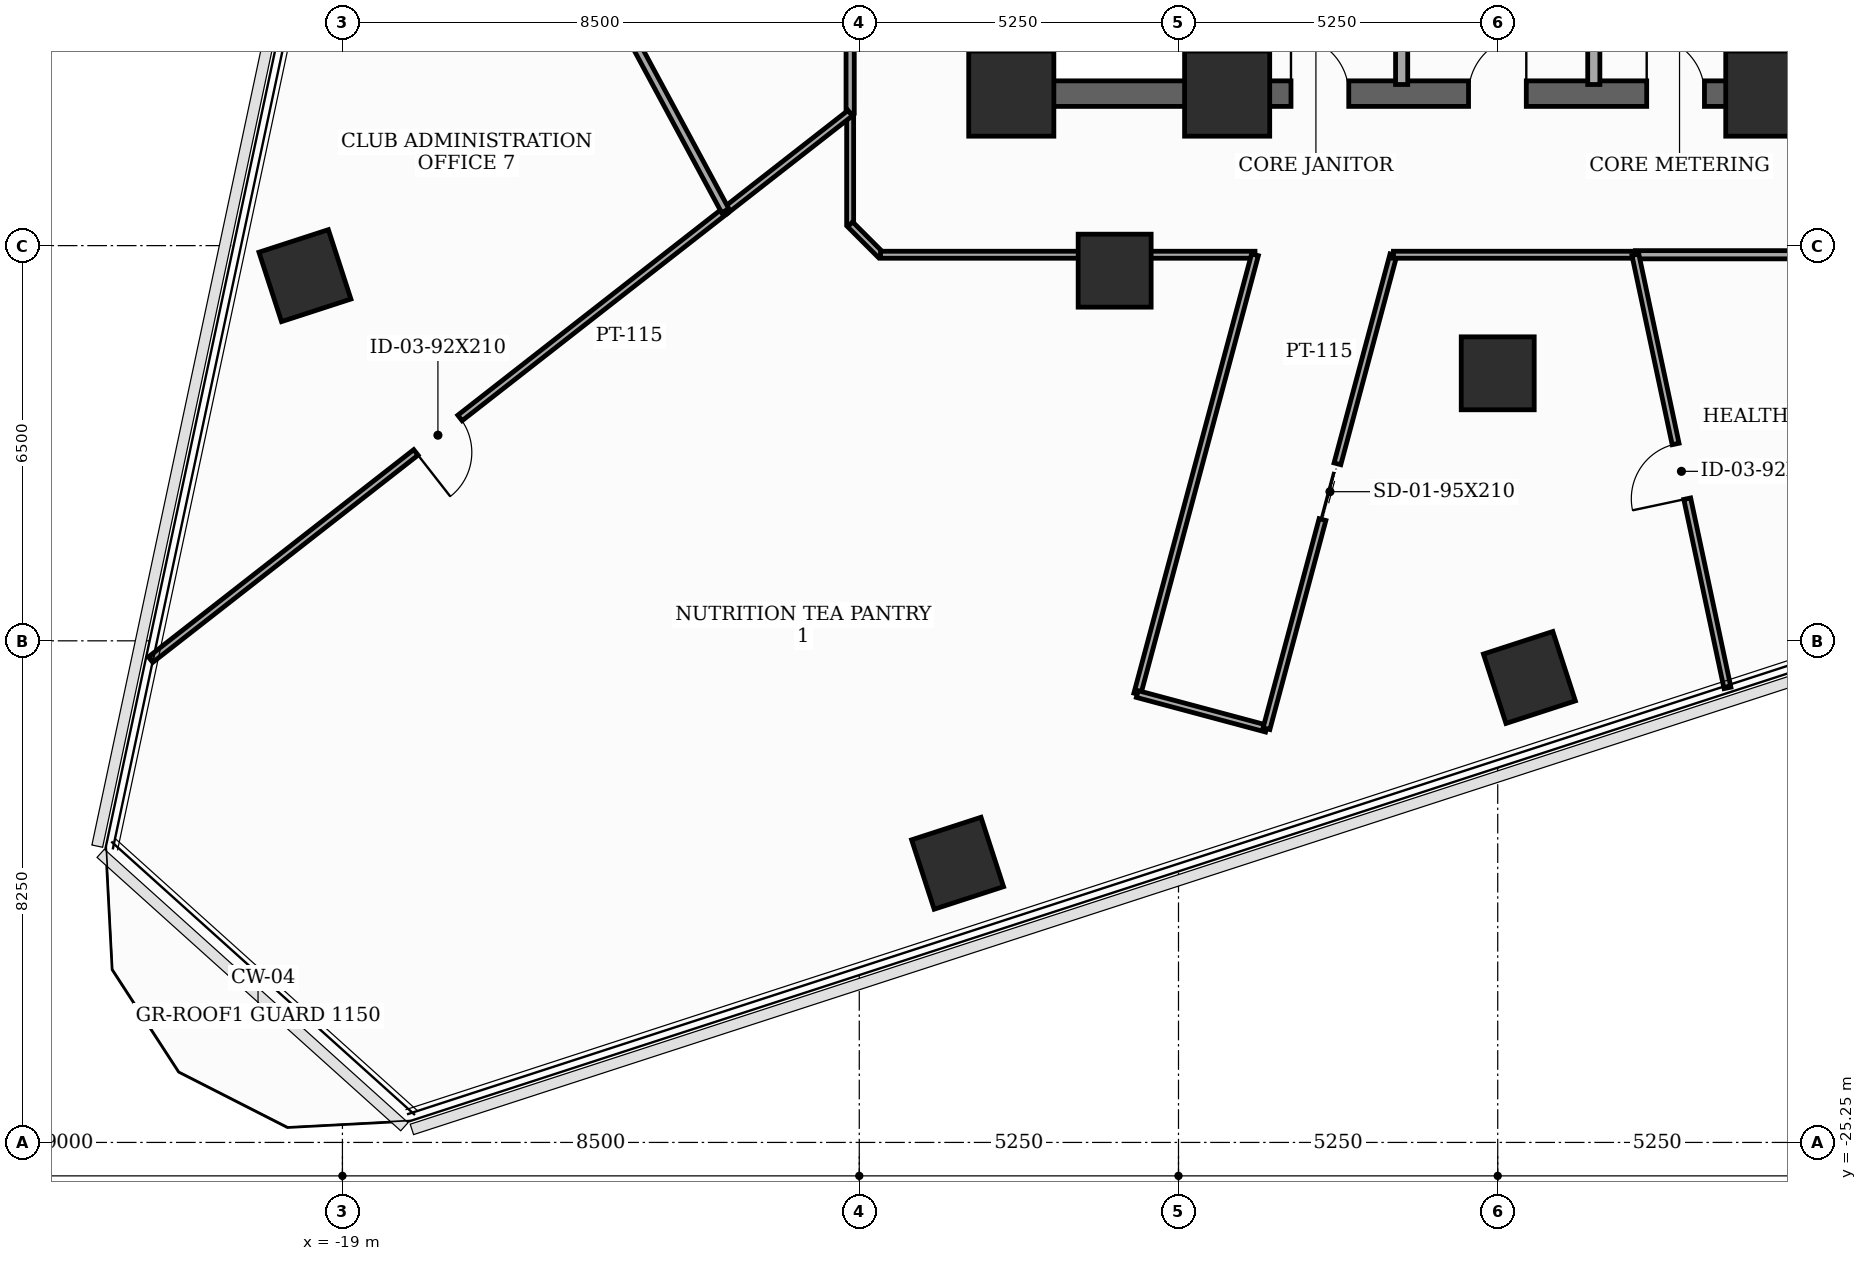
"""IFC4 building model, lengths in metres.
Left out: names, types, materials, properties, quantities, classifications, styles, units other than length and angle.
Written with IfcOpenShell. Run it as: python <this file> out.ifc"""

import sys

from ifc_helpers import new_model, si_unit, direction, frame, frame_2d, origin, origin_2d, place, context, subcontext, project, spatial, rectangle, extrude, element, fill, save


model = new_model("IFC4")
c1 = context("Model", 3, precision=1e-05, world=origin(), true_north=direction((0.0, 1.0)))
c2 = subcontext(c1, "Body", "Model", "MODEL_VIEW")
j1 = project(units=[si_unit("LENGTHUNIT", "METRE"), si_unit("PLANEANGLEUNIT", "RADIAN")], contexts=[c1])
p1 = place(None, origin())
s1 = spatial("IfcSite", under=j1, at=p1, CompositionType="ELEMENT")
p2 = place(p1, origin())
s2 = spatial("IfcBuilding", under=s1, at=p2, CompositionType="ELEMENT")
p3 = place(p2, frame((0.0, 0.0, 105.1)))
s3 = spatial("IfcBuildingStorey", under=s2, at=p3, CompositionType="ELEMENT", Elevation=105.1)
for number, where, z_axis, x_axis in (
    (1, (-8.0, -8.0, 0.0), (0.0, 0.0, 1.0), (1.0, 0.0, 0.0)),
    (2, (-4.45, -8.0, 0.0), (0.0, 0.0, 1.0), (1.0, 0.0, 0.0)),
    (3, (4.45, -8.0, 0.0), (0.0, 0.0, 1.0), (1.0, 0.0, 0.0)),
):
    element("IfcColumn", number, at=place(p3, frame(where, z_axis=z_axis, x_axis=x_axis)), inside=s3, PredefinedType="COLUMN", context=c2, shape_type="SweptSolid", body=[
        extrude(rectangle(XDim=1.4, YDim=1.4, at=origin_2d()), origin(), (0.0, 0.0, 1.0), 3.7),
    ])
for number, where, z_axis, x_axis in (
    (4, (-6.3, -10.912, 0.0), (0.0, 0.0, 1.0), (1.0, 0.0, 0.0)),
    (5, (0.0, -12.6, 0.0), (0.0, 0.0, 1.0), (1.0, 0.0, 0.0)),
    (6, (-8.883, -20.658, 0.0), (0.0, 0.0, 1.0), (0.951, 0.309, 0.0)),
    (7, (0.521, -17.603, 0.0), (0.0, 0.0, 1.0), (0.951, 0.309, 0.0)),
    (8, (-19.616, -10.994, 0.0), (0.0, 0.0, 1.0), (0.951, 0.309, 0.0)),
):
    element("IfcColumn", number, at=place(p3, frame(where, z_axis=z_axis, x_axis=x_axis)), inside=s3, PredefinedType="COLUMN", context=c2, shape_type="SweptSolid", body=[
        extrude(rectangle(XDim=1.2, YDim=1.2, at=origin_2d()), origin(), (0.0, 0.0, 1.0), 3.7),
    ])
p4 = place(p3, frame((-8.0, -8.0, 0.0), z_axis=(0.0, 0.0, 1.0), x_axis=(0.0, 1.0, 0.0)))
e9 = element("IfcWall", 9, at=p4, inside=s3, PredefinedType="SHEAR", context=c2, shape_type="SweptSolid", body=[
    extrude(rectangle(XDim=16.0, YDim=0.42, at=frame_2d((8.0, 0.0))), origin(), (0.0, 0.0, 1.0), 3.5),
])
p5 = place(p4, frame((0.922, 0.0, 0.0)))
e10 = element("IfcOpeningElement", 10, at=p5, cuts=e9, PredefinedType="OPENING", context=c2, shape_type="SweptSolid", body=[
    extrude(rectangle(XDim=0.85, YDim=2.02, at=frame_2d((0.425, 1.01))), frame((0.0, 0.22, 0.0), z_axis=(0.0, -1.0, 0.0), x_axis=(1.0, 0.0, 0.0)), (0.0, 0.0, 1.0), 0.44),
])
p6 = place(p4, frame((5.35, 0.0, 0.0)))
e11 = element("IfcOpeningElement", 11, at=p6, cuts=e9, PredefinedType="OPENING", context=c2, shape_type="SweptSolid", body=[
    extrude(rectangle(XDim=1.05, YDim=2.15, at=frame_2d((0.525, 1.075))), frame((0.0, 0.22, 0.0), z_axis=(0.0, -1.0, 0.0), x_axis=(1.0, 0.0, 0.0)), (0.0, 0.0, 1.0), 0.44),
])
p7 = place(p3, frame((-8.0, -8.0, 0.0), z_axis=(0.0, 0.0, 1.0), x_axis=(1.0, 0.0, 0.0)))
e12 = element("IfcWall", 12, at=p7, inside=s3, PredefinedType="SHEAR", context=c2, shape_type="SweptSolid", body=[
    extrude(rectangle(XDim=16.0, YDim=0.42, at=frame_2d((8.0, 0.0))), origin(), (0.0, 0.0, 1.0), 3.5),
])
p8 = place(p7, frame((4.6, 0.0, 0.0)))
e13 = element("IfcOpeningElement", 13, at=p8, cuts=e12, PredefinedType="OPENING", context=c2, shape_type="SweptSolid", body=[
    extrude(rectangle(XDim=0.95, YDim=2.1, at=frame_2d((0.475, 1.05))), frame((0.0, 0.22, 0.0), z_axis=(0.0, -1.0, 0.0), x_axis=(1.0, 0.0, 0.0)), (0.0, 0.0, 1.0), 0.44),
])
p9 = place(p7, frame((7.52, 0.0, 0.0)))
e14 = element("IfcOpeningElement", 14, at=p9, cuts=e12, PredefinedType="OPENING", context=c2, shape_type="SweptSolid", body=[
    extrude(rectangle(XDim=0.95, YDim=2.1, at=frame_2d((0.475, 1.05))), frame((0.0, 0.22, 0.0), z_axis=(0.0, -1.0, 0.0), x_axis=(1.0, 0.0, 0.0)), (0.0, 0.0, 1.0), 0.44),
])
p10 = place(p7, frame((10.45, 0.0, 0.0)))
e15 = element("IfcOpeningElement", 15, at=p10, cuts=e12, PredefinedType="OPENING", context=c2, shape_type="SweptSolid", body=[
    extrude(rectangle(XDim=0.95, YDim=2.1, at=frame_2d((0.475, 1.05))), frame((0.0, 0.22, 0.0), z_axis=(0.0, -1.0, 0.0), x_axis=(1.0, 0.0, 0.0)), (0.0, 0.0, 1.0), 0.44),
])
for number, where, z_axis, x_axis in (
    (16, (-4.45, -7.79, 0.0), (0.0, 0.0, 1.0), (0.0, 1.0, 0.0)),
    (17, (4.45, -7.79, 0.0), (0.0, 0.0, 1.0), (0.0, 1.0, 0.0)),
):
    element("IfcWall", number, at=place(p3, frame(where, z_axis=z_axis, x_axis=x_axis)), inside=s3, PredefinedType="SHEAR", context=c2, shape_type="SweptSolid", body=[
        extrude(rectangle(XDim=15.58, YDim=0.3, at=frame_2d((7.79, 0.0))), origin(), (0.0, 0.0, 1.0), 3.5),
    ])
p11 = place(p3, frame((4.45, -7.26, 0.0), z_axis=(0.0, 0.0, 1.0), x_axis=(1.0, 0.0, 0.0)))
e18 = element("IfcWall", 18, at=p11, inside=s3, PredefinedType="SHEAR", context=c2, shape_type="SweptSolid", body=[
    extrude(rectangle(XDim=3.55, YDim=0.3, at=frame_2d((1.775, 0.0))), origin(), (0.0, 0.0, 1.0), 3.5),
])
for number, where, z_axis, x_axis in (
    (19, (-1.58, -7.85, 0.0), (0.0, 0.0, 1.0), (0.0, 1.0, 0.0)),
    (20, (1.58, -7.85, 0.0), (0.0, 0.0, 1.0), (0.0, 1.0, 0.0)),
):
    element("IfcWall", number, at=place(p3, frame(where, z_axis=z_axis, x_axis=x_axis)), inside=s3, PredefinedType="SOLIDWALL", context=c2, shape_type="SweptSolid", body=[
        extrude(rectangle(XDim=2.95, YDim=0.2, at=frame_2d((1.475, 0.0))), origin(), (0.0, 0.0, 1.0), 2.885),
    ])
p12 = place(p3, frame((-10.65, -8.321, 0.0), z_axis=(0.0, 0.0, 1.0), x_axis=(0.0, -1.0, 0.0)))
e21 = element("IfcWall", 21, at=p12, inside=s3, PredefinedType="PARTITIONING", context=c2, shape_type="SweptSolid", body=[
    extrude(rectangle(XDim=1.829, YDim=0.115, at=frame_2d((0.915, 0.0))), origin(), (0.0, 0.0, 1.0), 3.5),
])
p13 = place(p3, frame((-10.65, -10.15, 0.0), z_axis=(0.0, 0.0, 1.0), x_axis=(0.707106781187, -0.707106781187, 0.0)))
e22 = element("IfcWall", 22, at=p13, inside=s3, PredefinedType="PARTITIONING", context=c2, shape_type="SweptSolid", body=[
    extrude(rectangle(XDim=0.707, YDim=0.115, at=frame_2d((0.354, 0.0))), origin(), (0.0, 0.0, 1.0), 3.5),
])
p14 = place(p3, frame((-10.15, -10.65, 0.0), z_axis=(0.0, 0.0, 1.0), x_axis=(1.0, 0.0, 0.0)))
e23 = element("IfcWall", 23, at=p14, inside=s3, PredefinedType="PARTITIONING", context=c2, shape_type="SweptSolid", body=[
    extrude(rectangle(XDim=6.158, YDim=0.115, at=frame_2d((3.079, 0.0))), origin(), (0.0, 0.0, 1.0), 2.785),
])
p15 = place(p3, frame((-3.992, -10.65, 0.0), z_axis=(0.0, 0.0, 1.0), x_axis=(-0.258828534142, -0.965923283659, 0.0)))
e24 = element("IfcWall", 24, at=p15, inside=s3, PredefinedType="PARTITIONING", context=c2, shape_type="SweptSolid", body=[
    extrude(rectangle(XDim=7.48, YDim=0.115, at=frame_2d((3.74, 0.0))), origin(), (0.0, 0.0, 1.0), 2.785),
])
p16 = place(p3, frame((-5.928, -17.875, 0.0), z_axis=(0.0, 0.0, 1.0), x_axis=(0.965959937537, -0.258691706618, 0.0)))
e25 = element("IfcWall", 25, at=p16, inside=s3, PredefinedType="PARTITIONING", context=c2, shape_type="SweptSolid", body=[
    extrude(rectangle(XDim=2.2, YDim=0.115, at=frame_2d((1.1, 0.0))), origin(), (0.0, 0.0, 1.0), 3.5),
])
p17 = place(p3, frame((-3.803, -18.444, 0.0), z_axis=(0.0, 0.0, 1.0), x_axis=(0.258754737882, 0.965943055062, 0.0)))
e26 = element("IfcWall", 26, at=p17, inside=s3, PredefinedType="PARTITIONING", context=c2, shape_type="SweptSolid", body=[
    extrude(rectangle(XDim=8.069, YDim=0.115, at=frame_2d((4.035, 0.0))), origin(), (0.0, 0.0, 1.0), 2.785),
])
p18 = place(p17, frame((3.559, 0.0, 0.0)))
e27 = element("IfcOpeningElement", 27, at=p18, cuts=e26, PredefinedType="OPENING", context=c2, shape_type="SweptSolid", body=[
    extrude(rectangle(XDim=0.95, YDim=2.1, at=frame_2d((0.475, 1.05))), frame((0.0, 0.067, 0.0), z_axis=(0.0, -1.0, 0.0), x_axis=(1.0, 0.0, 0.0)), (0.0, 0.0, 1.0), 0.135),
])
p19 = place(p3, frame((-1.715, -10.65, 0.0), z_axis=(0.0, 0.0, 1.0), x_axis=(1.0, 0.0, 0.0)))
e28 = element("IfcWall", 28, at=p19, inside=s3, PredefinedType="PARTITIONING", context=c2, shape_type="SweptSolid", body=[
    extrude(rectangle(XDim=3.979, YDim=0.115, at=frame_2d((1.99, 0.0))), origin(), (0.0, 0.0, 1.0), 2.785),
])
p20 = place(p3, frame((-10.65, -4.85, 0.0), z_axis=(0.0, 0.0, 1.0), x_axis=(0.0, -1.0, 0.0)))
e29 = element("IfcWall", 29, at=p20, inside=s3, PredefinedType="PARTITIONING", context=c2, shape_type="SweptSolid", body=[
    extrude(rectangle(XDim=3.471, YDim=0.135, at=frame_2d((1.735, 0.0))), origin(), (0.0, 0.0, 1.0), 2.785),
])
p21 = place(p3, frame((2.264, -10.65, 0.0), z_axis=(0.0, 0.0, 1.0), x_axis=(1.0, 0.0, 0.0)))
e30 = element("IfcWall", 30, at=p21, inside=s3, PredefinedType="PARTITIONING", context=c2, shape_type="SweptSolid", body=[
    extrude(rectangle(XDim=7.886, YDim=0.135, at=frame_2d((3.943, 0.0))), origin(), (0.0, 0.0, 1.0), 2.785),
])
p22 = place(p3, frame((-10.65, -8.321, 0.0), z_axis=(0.0, 0.0, 1.0), x_axis=(-0.787998815749, -0.615676754782, 0.0)))
e31 = element("IfcWall", 31, at=p22, inside=s3, PredefinedType="PARTITIONING", context=c2, shape_type="SweptSolid", body=[
    extrude(rectangle(XDim=2.607, YDim=0.115, at=frame_2d((1.303, 0.0))), origin(), (0.0, 0.0, 1.0), 3.5),
])
p23 = place(p3, frame((-12.704, -9.926, 0.0), z_axis=(0.0, 0.0, 1.0), x_axis=(-0.788033940978, -0.615631795692, 0.0)))
e32 = element("IfcWall", 32, at=p23, inside=s3, PredefinedType="PARTITIONING", context=c2, shape_type="SweptSolid", body=[
    extrude(rectangle(XDim=11.993, YDim=0.115, at=frame_2d((5.997, 0.0))), origin(), (0.0, 0.0, 1.0), 2.935),
])
p24 = place(p23, frame((5.537, 0.0, 0.0)))
e33 = element("IfcOpeningElement", 33, at=p24, cuts=e32, PredefinedType="OPENING", context=c2, shape_type="SweptSolid", body=[
    extrude(rectangle(XDim=0.92, YDim=2.1, at=frame_2d((0.46, 1.05))), frame((0.0, 0.067, 0.0), z_axis=(0.0, -1.0, 0.0), x_axis=(1.0, 0.0, 0.0)), (0.0, 0.0, 1.0), 0.135),
])
p25 = place(p3, frame((3.778, -17.774, 0.0), z_axis=(0.0, 0.0, 1.0), x_axis=(-0.207917284361, 0.978146411773, 0.0)))
e34 = element("IfcWall", 34, at=p25, inside=s3, PredefinedType="PARTITIONING", context=c2, shape_type="SweptSolid", body=[
    extrude(rectangle(XDim=7.284, YDim=0.115, at=frame_2d((3.642, 0.0))), origin(), (0.0, 0.0, 1.0), 2.785),
])
p26 = place(p25, frame((3.182, 0.0, 0.0)))
e35 = element("IfcOpeningElement", 35, at=p26, cuts=e34, PredefinedType="OPENING", context=c2, shape_type="SweptSolid", body=[
    extrude(rectangle(XDim=0.92, YDim=2.1, at=frame_2d((0.46, 1.05))), frame((0.0, 0.067, 0.0), z_axis=(0.0, -1.0, 0.0), x_axis=(1.0, 0.0, 0.0)), (0.0, 0.0, 1.0), 0.135),
])
p27 = place(p3, frame((-15.478, -4.781, 0.0), z_axis=(0.0, 0.0, 1.0), x_axis=(0.47456801742, -0.880218834633, 0.0)))
e36 = element("IfcWall", 36, at=p27, inside=s3, PredefinedType="PARTITIONING", context=c2, shape_type="SweptSolid", body=[
    extrude(rectangle(XDim=5.845, YDim=0.135, at=frame_2d((2.923, 0.0))), origin(), (0.0, 0.0, 1.0), 2.785),
])
p28 = place(p8, origin())
e37 = element("IfcDoor", 37, at=p28, inside=s3, OperationType="SINGLE_SWING_LEFT", PredefinedType="DOOR", context=c2, shape_type="SweptSolid", body=[
    extrude(rectangle(XDim=0.95, YDim=2.1, at=frame_2d((0.475, 1.05))), frame((0.0, 0.025, 0.0), z_axis=(0.0, -1.0, 0.0), x_axis=(1.0, 0.0, 0.0)), (0.0, 0.0, 1.0), 0.05),
])
fill(e13, e37)
p29 = place(p9, origin())
e38 = element("IfcDoor", 38, at=p29, inside=s3, OperationType="SINGLE_SWING_RIGHT", PredefinedType="DOOR", context=c2, shape_type="SweptSolid", body=[
    extrude(rectangle(XDim=0.95, YDim=2.1, at=frame_2d((0.475, 1.05))), frame((0.0, 0.025, 0.0), z_axis=(0.0, -1.0, 0.0), x_axis=(1.0, 0.0, 0.0)), (0.0, 0.0, 1.0), 0.05),
])
fill(e14, e38)
p30 = place(p10, origin())
e39 = element("IfcDoor", 39, at=p30, inside=s3, OperationType="SINGLE_SWING_LEFT", PredefinedType="DOOR", context=c2, shape_type="SweptSolid", body=[
    extrude(rectangle(XDim=0.95, YDim=2.1, at=frame_2d((0.475, 1.05))), frame((0.0, 0.025, 0.0), z_axis=(0.0, -1.0, 0.0), x_axis=(1.0, 0.0, 0.0)), (0.0, 0.0, 1.0), 0.05),
])
fill(e15, e39)
p31 = place(p18, origin())
e40 = element("IfcDoor", 40, at=p31, inside=s3, OperationType="SLIDING_TO_LEFT", PredefinedType="DOOR", context=c2, shape_type="SweptSolid", body=[
    extrude(rectangle(XDim=0.95, YDim=2.1, at=frame_2d((0.475, 1.05))), frame((0.0, 0.025, 0.0), z_axis=(0.0, -1.0, 0.0), x_axis=(1.0, 0.0, 0.0)), (0.0, 0.0, 1.0), 0.05),
])
fill(e27, e40)
p32 = place(p24, origin())
e41 = element("IfcDoor", 41, at=p32, inside=s3, OperationType="SINGLE_SWING_RIGHT", PredefinedType="DOOR", context=c2, shape_type="SweptSolid", body=[
    extrude(rectangle(XDim=0.92, YDim=2.1, at=frame_2d((0.46, 1.05))), frame((0.0, 0.025, 0.0), z_axis=(0.0, -1.0, 0.0), x_axis=(1.0, 0.0, 0.0)), (0.0, 0.0, 1.0), 0.05),
])
fill(e33, e41)
p33 = place(p26, origin())
e42 = element("IfcDoor", 42, at=p33, inside=s3, OperationType="SINGLE_SWING_LEFT", PredefinedType="DOOR", context=c2, shape_type="SweptSolid", body=[
    extrude(rectangle(XDim=0.92, YDim=2.1, at=frame_2d((0.46, 1.05))), frame((0.0, 0.025, 0.0), z_axis=(0.0, -1.0, 0.0), x_axis=(1.0, 0.0, 0.0)), (0.0, 0.0, 1.0), 0.05),
])
fill(e35, e42)
save(model, sys.argv[1])
